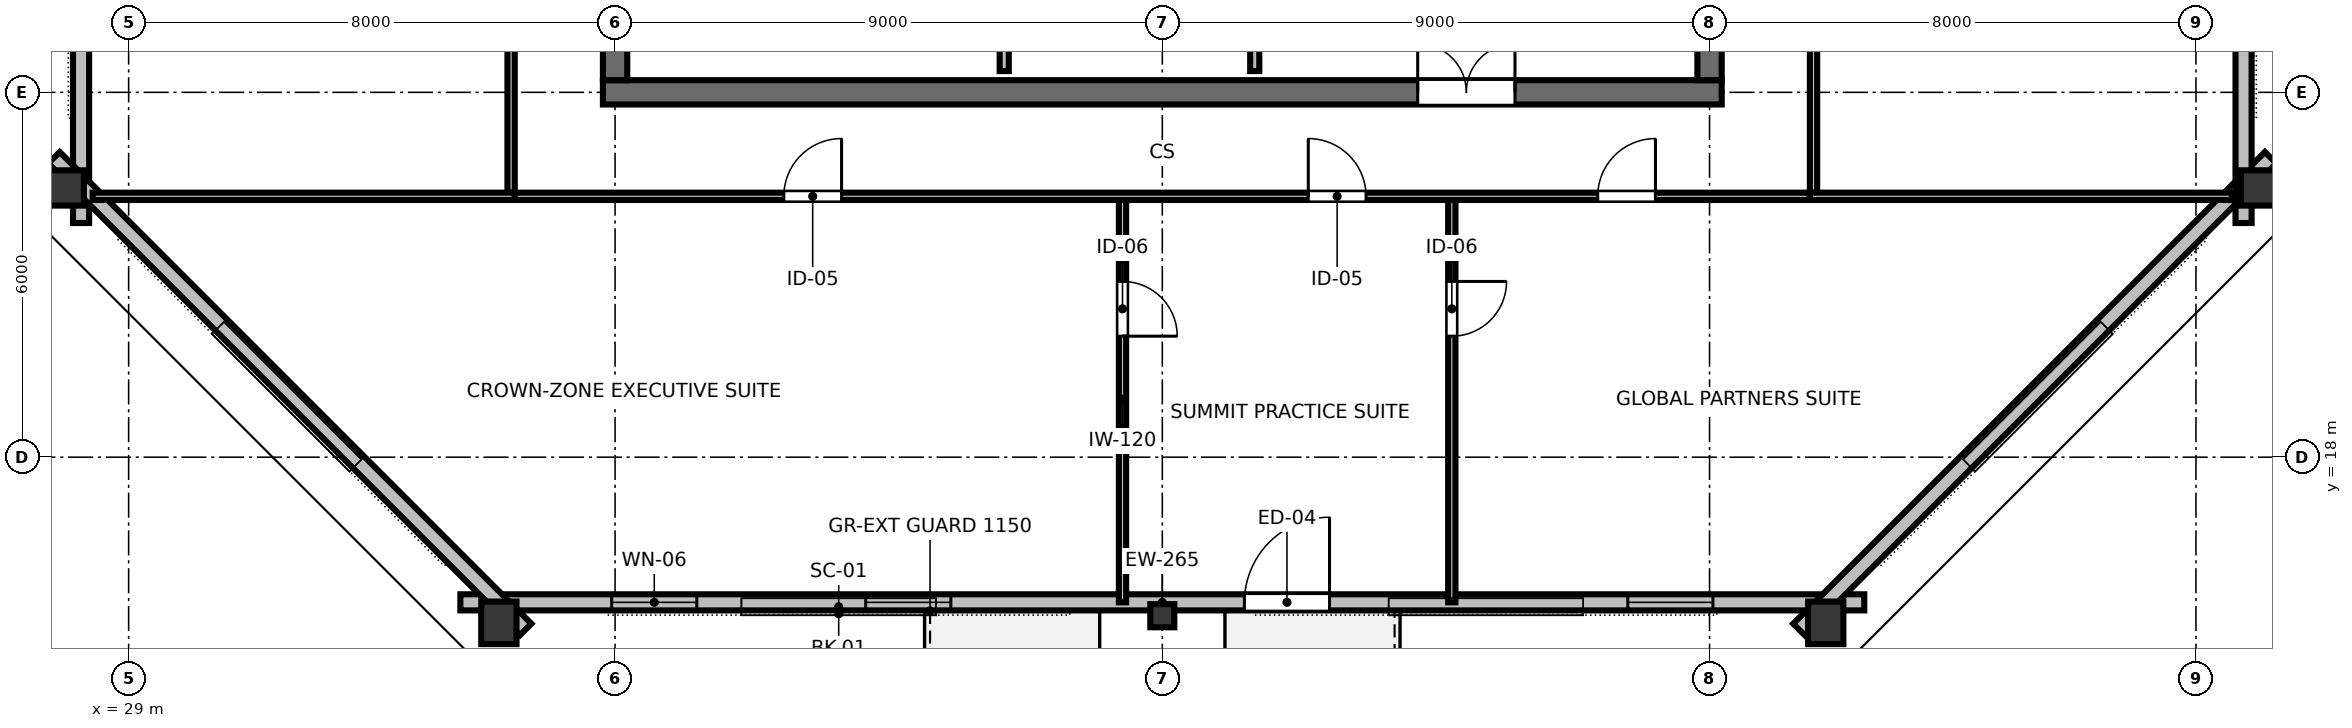
"""IFC4 building model, lengths in metres.
Left out: names, types, materials, properties, quantities, classifications, styles, units other than length and angle.
Written with IfcOpenShell. Run it as: python <this file> out.ifc"""

import sys

from ifc_helpers import new_model, si_unit, direction, frame, frame_2d, origin, origin_2d, place, context, subcontext, project, spatial, rectangle, hollow_rectangle, i_section, extrude, element, fill, save


model = new_model("IFC4")
c1 = context("Model", 3, precision=1e-05, world=origin(), true_north=direction((0.0, 1.0)))
c2 = subcontext(c1, "Body", "Model", "MODEL_VIEW")
j1 = project(units=[si_unit("LENGTHUNIT", "METRE"), si_unit("PLANEANGLEUNIT", "RADIAN")], contexts=[c1])
p1 = place(None, origin())
s1 = spatial("IfcSite", under=j1, at=p1, CompositionType="ELEMENT")
p2 = place(p1, origin())
s2 = spatial("IfcBuilding", under=s1, at=p2, CompositionType="ELEMENT")
p3 = place(p2, frame((0.0, 0.0, 261.0)))
s3 = spatial("IfcBuildingStorey", under=s2, at=p3, CompositionType="ELEMENT", Elevation=261.0)
p4 = place(p3, frame((36.8, 24.0, 0.0), z_axis=(0.0, 0.0, 1.0), x_axis=(1.0, 0.0, 0.0)))
e1 = element("IfcWall", 1, at=p4, inside=s3, PredefinedType="SHEAR", context=c2, shape_type="SweptSolid", body=[
    extrude(rectangle(XDim=18.4, YDim=0.4, at=frame_2d((9.2, 0.0))), origin(), (0.0, 0.0, 1.0), 3.36),
])
p5 = place(p4, frame((13.4, 0.0, 0.0)))
e2 = element("IfcOpeningElement", 2, at=p5, cuts=e1, PredefinedType="OPENING", context=c2, shape_type="SweptSolid", body=[
    extrude(rectangle(XDim=1.6, YDim=2.15, at=frame_2d((0.8, 1.075))), frame((0.0, 0.21, 0.0), z_axis=(0.0, -1.0, 0.0), x_axis=(1.0, 0.0, 0.0)), (0.0, 0.0, 1.0), 0.42),
])
p6 = place(p3, frame((37.0, 24.2, 0.0), z_axis=(0.0, 0.0, 1.0), x_axis=(0.0, 1.0, 0.0)))
e3 = element("IfcWall", 3, at=p6, inside=s3, PredefinedType="SHEAR", context=c2, shape_type="SweptSolid", body=[
    extrude(rectangle(XDim=15.6, YDim=0.4, at=frame_2d((7.8, 0.0))), origin(), (0.0, 0.0, 1.0), 3.36),
])
p7 = place(p6, frame((5.325, 0.0, 0.0)))
e4 = element("IfcOpeningElement", 4, at=p7, cuts=e3, PredefinedType="OPENING", context=c2, shape_type="SweptSolid", body=[
    extrude(rectangle(XDim=1.15, YDim=2.15, at=frame_2d((0.575, 1.075))), frame((0.0, 0.21, 0.0), z_axis=(0.0, -1.0, 0.0), x_axis=(1.0, 0.0, 0.0)), (0.0, 0.0, 1.0), 0.42),
])
p8 = place(p3, frame((55.0, 24.2, 0.0), z_axis=(0.0, 0.0, 1.0), x_axis=(0.0, 1.0, 0.0)))
e5 = element("IfcWall", 5, at=p8, inside=s3, PredefinedType="SHEAR", context=c2, shape_type="SweptSolid", body=[
    extrude(rectangle(XDim=15.6, YDim=0.4, at=frame_2d((7.8, 0.0))), origin(), (0.0, 0.0, 1.0), 3.36),
])
p9 = place(p8, frame((5.325, 0.0, 0.0)))
e6 = element("IfcOpeningElement", 6, at=p9, cuts=e5, PredefinedType="OPENING", context=c2, shape_type="SweptSolid", body=[
    extrude(rectangle(XDim=1.15, YDim=2.15, at=frame_2d((0.575, 1.075))), frame((0.0, 0.21, 0.0), z_axis=(0.0, -1.0, 0.0), x_axis=(1.0, 0.0, 0.0)), (0.0, 0.0, 1.0), 0.42),
])
p10 = place(p3, frame((35.089, 15.276, 0.0), z_axis=(0.0, 0.0, 1.0), x_axis=(1.0, 0.0, 0.0)))
e7 = element("IfcColumn", 7, at=p10, inside=s3, PredefinedType="COLUMN", context=c2, shape_type="SweptSolid", body=[
    extrude(hollow_rectangle(XDim=0.58, YDim=0.7, WallThickness=0.032, at=origin_2d()), origin(), (0.0, 0.0, 1.0), 3.373),
])
p11 = place(p3, frame((46.0, 15.393, 0.0), z_axis=(0.0, 0.0, 1.0), x_axis=(1.0, 0.0, 0.0)))
e8 = element("IfcColumn", 8, at=p11, inside=s3, PredefinedType="COLUMN", context=c2, shape_type="SweptSolid", body=[
    extrude(i_section(OverallWidth=0.395, OverallDepth=0.38, WebThickness=0.019, FlangeThickness=0.03, FilletRadius=0.025, at=origin_2d()), origin(), (0.0, 0.0, 1.0), 3.373),
])
for number, where, z_axis, x_axis in (
    (9, (56.911, 15.276, 0.0), (0.0, 0.0, 1.0), (1.0, 0.0, 0.0)),
    (10, (64.086, 22.428, 0.0), (0.0, 0.0, 1.0), (0.0, 1.0, 0.0)),
    (11, (27.914, 22.428, 0.0), (0.0, 0.0, 1.0), (0.0, 1.0, 0.0)),
):
    element("IfcColumn", number, at=place(p3, frame(where, z_axis=z_axis, x_axis=x_axis)), inside=s3, PredefinedType="COLUMN", context=c2, shape_type="SweptSolid", body=[
        extrude(hollow_rectangle(XDim=0.58, YDim=0.7, WallThickness=0.032, at=origin_2d()), origin(), (0.0, 0.0, 1.0), 3.373),
    ])
p12 = place(p3, frame((34.456, 15.613, 0.0), z_axis=(0.0, 0.0, 1.0), x_axis=(1.0, 0.0, 0.0)))
e12 = element("IfcWall", 12, at=p12, inside=s3, PredefinedType="STANDARD", context=c2, shape_type="SweptSolid", body=[
    extrude(rectangle(XDim=23.089, YDim=0.265, at=frame_2d((11.544, 0.0))), origin(), (0.0, 0.0, 1.0), 2.832),
])
p13 = place(p12, frame((12.895, 0.0, 0.0)))
e13 = element("IfcOpeningElement", 13, at=p13, cuts=e12, PredefinedType="OPENING", context=c2, shape_type="SweptSolid", body=[
    extrude(rectangle(XDim=1.4, YDim=2.15, at=frame_2d((0.7, 1.075))), frame((0.0, 0.142, 0.0), z_axis=(0.0, -1.0, 0.0), x_axis=(1.0, 0.0, 0.0)), (0.0, 0.0, 1.0), 0.285),
])
p14 = place(p12, frame((2.489, 0.0, 0.85)))
e14 = element("IfcOpeningElement", 14, at=p14, cuts=e12, PredefinedType="OPENING", context=c2, shape_type="SweptSolid", body=[
    extrude(rectangle(XDim=1.4, YDim=1.2, at=frame_2d((0.7, 0.6))), frame((0.0, 0.142, 0.0), z_axis=(0.0, -1.0, 0.0), x_axis=(1.0, 0.0, 0.0)), (0.0, 0.0, 1.0), 0.285),
])
p15 = place(p12, frame((6.667, 0.0, 0.85)))
e15 = element("IfcOpeningElement", 15, at=p15, cuts=e12, PredefinedType="OPENING", context=c2, shape_type="SweptSolid", body=[
    extrude(rectangle(XDim=1.4, YDim=1.2, at=frame_2d((0.7, 0.6))), frame((0.0, 0.142, 0.0), z_axis=(0.0, -1.0, 0.0), x_axis=(1.0, 0.0, 0.0)), (0.0, 0.0, 1.0), 0.285),
])
p16 = place(p12, frame((19.2, 0.0, 0.85)))
e16 = element("IfcOpeningElement", 16, at=p16, cuts=e12, PredefinedType="OPENING", context=c2, shape_type="SweptSolid", body=[
    extrude(rectangle(XDim=1.4, YDim=1.2, at=frame_2d((0.7, 0.6))), frame((0.0, 0.142, 0.0), z_axis=(0.0, -1.0, 0.0), x_axis=(1.0, 0.0, 0.0)), (0.0, 0.0, 1.0), 0.285),
])
p17 = place(p3, frame((56.47, 15.168, 0.0), z_axis=(0.0, 0.0, 1.0), x_axis=(0.707106781187, 0.707106781187, 0.0)))
e17 = element("IfcWall", 17, at=p17, inside=s3, PredefinedType="STANDARD", context=c2, shape_type="SweptSolid", body=[
    extrude(rectangle(XDim=10.971, YDim=0.265, at=frame_2d((5.485, 0.0))), origin(), (0.0, 0.0, 1.0), 2.832),
])
for number, where, z_axis, x_axis in (
    (18, (63.783, 21.851, 0.0), (0.0, 0.0, 1.0), (0.0, 1.0, 0.0)),
    (19, (28.217, 42.149, 0.0), (0.0, 0.0, 1.0), (0.0, -1.0, 0.0)),
):
    element("IfcWall", number, at=place(p3, frame(where, z_axis=z_axis, x_axis=x_axis)), inside=s3, PredefinedType="STANDARD", context=c2, shape_type="SweptSolid", body=[
        extrude(rectangle(XDim=20.298, YDim=0.265, at=frame_2d((10.149, 0.0))), origin(), (0.0, 0.0, 1.0), 2.832),
    ])
p18 = place(p3, frame((27.772, 22.925, 0.0), z_axis=(0.0, 0.0, 1.0), x_axis=(0.707106781187, -0.707106781187, 0.0)))
e20 = element("IfcWall", 20, at=p18, inside=s3, PredefinedType="STANDARD", context=c2, shape_type="SweptSolid", body=[
    extrude(rectangle(XDim=10.971, YDim=0.265, at=frame_2d((5.485, 0.0))), origin(), (0.0, 0.0, 1.0), 2.832),
])
p19 = place(p3, frame((43.4, 24.35, 0.0), z_axis=(0.0, 0.0, 1.0), x_axis=(0.0, 1.0, 0.0)))
e21 = element("IfcWall", 21, at=p19, inside=s3, PredefinedType="PARTITIONING", context=c2, shape_type="SweptSolid", body=[
    extrude(rectangle(XDim=3.9, YDim=0.15, at=frame_2d((1.95, 0.0))), origin(), (0.0, 0.0, 1.0), 3.375),
])
p20 = place(p19, frame((1.5, 0.0, 0.0)))
e22 = element("IfcOpeningElement", 22, at=p20, cuts=e21, PredefinedType="OPENING", context=c2, shape_type="SweptSolid", body=[
    extrude(rectangle(XDim=0.9, YDim=2.15, at=frame_2d((0.45, 1.075))), frame((0.0, 0.085, 0.0), z_axis=(0.0, -1.0, 0.0), x_axis=(1.0, 0.0, 0.0)), (0.0, 0.0, 1.0), 0.17),
])
p21 = place(p3, frame((47.52, 24.35, 0.0), z_axis=(0.0, 0.0, 1.0), x_axis=(0.0, 1.0, 0.0)))
e23 = element("IfcWall", 23, at=p21, inside=s3, PredefinedType="PARTITIONING", context=c2, shape_type="SweptSolid", body=[
    extrude(rectangle(XDim=3.9, YDim=0.15, at=frame_2d((1.95, 0.0))), origin(), (0.0, 0.0, 1.0), 3.375),
])
p22 = place(p21, frame((0.35, 0.0, 0.0)))
e24 = element("IfcOpeningElement", 24, at=p22, cuts=e23, PredefinedType="OPENING", context=c2, shape_type="SweptSolid", body=[
    extrude(rectangle(XDim=0.9, YDim=2.15, at=frame_2d((0.45, 1.075))), frame((0.0, 0.085, 0.0), z_axis=(0.0, -1.0, 0.0), x_axis=(1.0, 0.0, 0.0)), (0.0, 0.0, 1.0), 0.17),
])
p23 = place(p3, frame((45.345, 22.29, 0.0), z_axis=(0.0, 0.0, 1.0), x_axis=(0.0, -1.0, 0.0)))
e25 = element("IfcWall", 25, at=p23, inside=s3, PredefinedType="PARTITIONING", context=c2, shape_type="SweptSolid", body=[
    extrude(rectangle(XDim=6.677, YDim=0.12, at=frame_2d((3.339, 0.0))), origin(), (0.0, 0.0, 1.0), 2.655),
])
p24 = place(p23, frame((1.4, 0.0, 0.0)))
e26 = element("IfcOpeningElement", 26, at=p24, cuts=e25, PredefinedType="OPENING", context=c2, shape_type="SweptSolid", body=[
    extrude(rectangle(XDim=0.9, YDim=2.15, at=frame_2d((0.45, 1.075))), frame((0.0, 0.07, 0.0), z_axis=(0.0, -1.0, 0.0), x_axis=(1.0, 0.0, 0.0)), (0.0, 0.0, 1.0), 0.14),
])
p25 = place(p3, frame((50.761, 22.29, 0.0), z_axis=(0.0, 0.0, 1.0), x_axis=(0.0, -1.0, 0.0)))
e27 = element("IfcWall", 27, at=p25, inside=s3, PredefinedType="PARTITIONING", context=c2, shape_type="SweptSolid", body=[
    extrude(rectangle(XDim=6.677, YDim=0.12, at=frame_2d((3.339, 0.0))), origin(), (0.0, 0.0, 1.0), 2.655),
])
p26 = place(p25, frame((1.4, 0.0, 0.0)))
e28 = element("IfcOpeningElement", 28, at=p26, cuts=e27, PredefinedType="OPENING", context=c2, shape_type="SweptSolid", body=[
    extrude(rectangle(XDim=0.9, YDim=2.15, at=frame_2d((0.45, 1.075))), frame((0.0, 0.07, 0.0), z_axis=(0.0, -1.0, 0.0), x_axis=(1.0, 0.0, 0.0)), (0.0, 0.0, 1.0), 0.14),
])
p27 = place(p3, frame((35.35, 22.29, 0.0), z_axis=(0.0, 0.0, 1.0), x_axis=(1.0, 0.0, 0.0)))
e29 = element("IfcWall", 29, at=p27, inside=s3, PredefinedType="PARTITIONING", context=c2, shape_type="SweptSolid", body=[
    extrude(rectangle(XDim=21.3, YDim=0.12, at=frame_2d((10.65, 0.0))), origin(), (0.0, 0.0, 1.0), 2.655),
])
p28 = place(p27, frame((4.425, 0.0, 0.0)))
e30 = element("IfcOpeningElement", 30, at=p28, cuts=e29, PredefinedType="OPENING", context=c2, shape_type="SweptSolid", body=[
    extrude(rectangle(XDim=0.95, YDim=2.15, at=frame_2d((0.475, 1.075))), frame((0.0, 0.07, 0.0), z_axis=(0.0, -1.0, 0.0), x_axis=(1.0, 0.0, 0.0)), (0.0, 0.0, 1.0), 0.14),
])
p29 = place(p27, frame((13.051, 0.0, 0.0)))
e31 = element("IfcOpeningElement", 31, at=p29, cuts=e29, PredefinedType="OPENING", context=c2, shape_type="SweptSolid", body=[
    extrude(rectangle(XDim=0.95, YDim=2.15, at=frame_2d((0.475, 1.075))), frame((0.0, 0.07, 0.0), z_axis=(0.0, -1.0, 0.0), x_axis=(1.0, 0.0, 0.0)), (0.0, 0.0, 1.0), 0.14),
])
p30 = place(p27, frame((17.811, 0.0, 0.0)))
e32 = element("IfcOpeningElement", 32, at=p30, cuts=e29, PredefinedType="OPENING", context=c2, shape_type="SweptSolid", body=[
    extrude(rectangle(XDim=0.95, YDim=2.15, at=frame_2d((0.475, 1.075))), frame((0.0, 0.07, 0.0), z_axis=(0.0, -1.0, 0.0), x_axis=(1.0, 0.0, 0.0)), (0.0, 0.0, 1.0), 0.14),
])
p31 = place(p3, frame((35.29, 22.35, 0.0), z_axis=(0.0, 0.0, 1.0), x_axis=(0.0, 1.0, 0.0)))
e33 = element("IfcWall", 33, at=p31, inside=s3, PredefinedType="PARTITIONING", context=c2, shape_type="SweptSolid", body=[
    extrude(rectangle(XDim=19.3, YDim=0.12, at=frame_2d((9.65, 0.0))), origin(), (0.0, 0.0, 1.0), 2.655),
])
p32 = place(p31, frame((2.847, 0.0, 0.0)))
e34 = element("IfcOpeningElement", 34, at=p32, cuts=e33, PredefinedType="OPENING", context=c2, shape_type="SweptSolid", body=[
    extrude(rectangle(XDim=0.95, YDim=2.15, at=frame_2d((0.475, 1.075))), frame((0.0, 0.07, 0.0), z_axis=(0.0, -1.0, 0.0), x_axis=(1.0, 0.0, 0.0)), (0.0, 0.0, 1.0), 0.14),
])
p33 = place(p31, frame((8.606, 0.0, 0.0)))
e35 = element("IfcOpeningElement", 35, at=p33, cuts=e33, PredefinedType="OPENING", context=c2, shape_type="SweptSolid", body=[
    extrude(rectangle(XDim=0.95, YDim=2.15, at=frame_2d((0.475, 1.075))), frame((0.0, 0.07, 0.0), z_axis=(0.0, -1.0, 0.0), x_axis=(1.0, 0.0, 0.0)), (0.0, 0.0, 1.0), 0.14),
])
p34 = place(p31, frame((14.935, 0.0, 0.0)))
e36 = element("IfcOpeningElement", 36, at=p34, cuts=e33, PredefinedType="OPENING", context=c2, shape_type="SweptSolid", body=[
    extrude(rectangle(XDim=0.95, YDim=2.15, at=frame_2d((0.475, 1.075))), frame((0.0, 0.07, 0.0), z_axis=(0.0, -1.0, 0.0), x_axis=(1.0, 0.0, 0.0)), (0.0, 0.0, 1.0), 0.14),
])
p35 = place(p3, frame((56.71, 22.35, 0.0), z_axis=(0.0, 0.0, 1.0), x_axis=(0.0, 1.0, 0.0)))
e37 = element("IfcWall", 37, at=p35, inside=s3, PredefinedType="PARTITIONING", context=c2, shape_type="SweptSolid", body=[
    extrude(rectangle(XDim=19.3, YDim=0.12, at=frame_2d((9.65, 0.0))), origin(), (0.0, 0.0, 1.0), 2.655),
])
p36 = place(p35, frame((3.646, 0.0, 0.0)))
e38 = element("IfcOpeningElement", 38, at=p36, cuts=e37, PredefinedType="OPENING", context=c2, shape_type="SweptSolid", body=[
    extrude(rectangle(XDim=0.95, YDim=2.15, at=frame_2d((0.475, 1.075))), frame((0.0, 0.07, 0.0), z_axis=(0.0, -1.0, 0.0), x_axis=(1.0, 0.0, 0.0)), (0.0, 0.0, 1.0), 0.14),
])
p37 = place(p35, frame((13.096, 0.0, 0.0)))
e39 = element("IfcOpeningElement", 39, at=p37, cuts=e37, PredefinedType="OPENING", context=c2, shape_type="SweptSolid", body=[
    extrude(rectangle(XDim=0.95, YDim=2.15, at=frame_2d((0.475, 1.075))), frame((0.0, 0.07, 0.0), z_axis=(0.0, -1.0, 0.0), x_axis=(1.0, 0.0, 0.0)), (0.0, 0.0, 1.0), 0.14),
])
for number, where, z_axis, x_axis in (
    (40, (35.35, 22.29, 0.0), (0.0, 0.0, 1.0), (-1.0, 0.0, 0.0)),
    (41, (56.65, 22.29, 0.0), (0.0, 0.0, 1.0), (1.0, 0.0, 0.0)),
):
    element("IfcWall", number, at=place(p3, frame(where, z_axis=z_axis, x_axis=x_axis)), inside=s3, PredefinedType="PARTITIONING", context=c2, shape_type="SweptSolid", body=[
        extrude(rectangle(XDim=6.942, YDim=0.12, at=frame_2d((3.471, 0.0))), origin(), (0.0, 0.0, 1.0), 2.655),
    ])
p38 = place(p13, origin())
e42 = element("IfcDoor", 42, at=p38, inside=s3, OperationType="SINGLE_SWING_RIGHT", PredefinedType="DOOR", context=c2, shape_type="SweptSolid", body=[
    extrude(rectangle(XDim=1.4, YDim=2.15, at=frame_2d((0.7, 1.075))), frame((0.0, 0.025, 0.0), z_axis=(0.0, -1.0, 0.0), x_axis=(1.0, 0.0, 0.0)), (0.0, 0.0, 1.0), 0.05),
])
fill(e13, e42)
p39 = place(p14, origin())
e43 = element("IfcWindow", 43, at=p39, inside=s3, PartitioningType="SINGLE_PANEL", PredefinedType="WINDOW", context=c2, shape_type="SweptSolid", body=[
    extrude(rectangle(XDim=1.4, YDim=1.2, at=frame_2d((0.7, 0.6))), frame((0.0, 0.03, 0.0), z_axis=(0.0, -1.0, 0.0), x_axis=(1.0, 0.0, 0.0)), (0.0, 0.0, 1.0), 0.06),
])
fill(e14, e43)
p40 = place(p15, origin())
e44 = element("IfcWindow", 44, at=p40, inside=s3, PartitioningType="SINGLE_PANEL", PredefinedType="WINDOW", context=c2, shape_type="SweptSolid", body=[
    extrude(rectangle(XDim=1.4, YDim=1.2, at=frame_2d((0.7, 0.6))), frame((0.0, 0.03, 0.0), z_axis=(0.0, -1.0, 0.0), x_axis=(1.0, 0.0, 0.0)), (0.0, 0.0, 1.0), 0.06),
])
fill(e15, e44)
p41 = place(p16, origin())
e45 = element("IfcWindow", 45, at=p41, inside=s3, PartitioningType="SINGLE_PANEL", PredefinedType="WINDOW", context=c2, shape_type="SweptSolid", body=[
    extrude(rectangle(XDim=1.4, YDim=1.2, at=frame_2d((0.7, 0.6))), frame((0.0, 0.03, 0.0), z_axis=(0.0, -1.0, 0.0), x_axis=(1.0, 0.0, 0.0)), (0.0, 0.0, 1.0), 0.06),
])
fill(e16, e45)
p42 = place(p5, origin())
e46 = element("IfcDoor", 46, at=p42, inside=s3, OperationType="DOUBLE_DOOR_SINGLE_SWING", PredefinedType="DOOR", context=c2, shape_type="SweptSolid", body=[
    extrude(rectangle(XDim=1.6, YDim=2.15, at=frame_2d((0.8, 1.075))), frame((0.0, 0.025, 0.0), z_axis=(0.0, -1.0, 0.0), x_axis=(1.0, 0.0, 0.0)), (0.0, 0.0, 1.0), 0.05),
])
fill(e2, e46)
p43 = place(p24, origin())
e47 = element("IfcDoor", 47, at=p43, inside=s3, OperationType="SINGLE_SWING_RIGHT", PredefinedType="DOOR", context=c2, shape_type="SweptSolid", body=[
    extrude(rectangle(XDim=0.9, YDim=2.15, at=frame_2d((0.45, 1.075))), frame((0.0, 0.025, 0.0), z_axis=(0.0, -1.0, 0.0), x_axis=(1.0, 0.0, 0.0)), (0.0, 0.0, 1.0), 0.05),
])
fill(e26, e47)
p44 = place(p26, origin())
e48 = element("IfcDoor", 48, at=p44, inside=s3, OperationType="SINGLE_SWING_LEFT", PredefinedType="DOOR", context=c2, shape_type="SweptSolid", body=[
    extrude(rectangle(XDim=0.9, YDim=2.15, at=frame_2d((0.45, 1.075))), frame((0.0, 0.025, 0.0), z_axis=(0.0, -1.0, 0.0), x_axis=(1.0, 0.0, 0.0)), (0.0, 0.0, 1.0), 0.05),
])
fill(e28, e48)
p45 = place(p28, origin())
e49 = element("IfcDoor", 49, at=p45, inside=s3, OperationType="SINGLE_SWING_RIGHT", PredefinedType="DOOR", context=c2, shape_type="SweptSolid", body=[
    extrude(rectangle(XDim=0.95, YDim=2.15, at=frame_2d((0.475, 1.075))), frame((0.0, 0.025, 0.0), z_axis=(0.0, -1.0, 0.0), x_axis=(1.0, 0.0, 0.0)), (0.0, 0.0, 1.0), 0.05),
])
fill(e30, e49)
p46 = place(p29, origin())
e50 = element("IfcDoor", 50, at=p46, inside=s3, OperationType="SINGLE_SWING_LEFT", PredefinedType="DOOR", context=c2, shape_type="SweptSolid", body=[
    extrude(rectangle(XDim=0.95, YDim=2.15, at=frame_2d((0.475, 1.075))), frame((0.0, 0.025, 0.0), z_axis=(0.0, -1.0, 0.0), x_axis=(1.0, 0.0, 0.0)), (0.0, 0.0, 1.0), 0.05),
])
fill(e31, e50)
p47 = place(p30, origin())
e51 = element("IfcDoor", 51, at=p47, inside=s3, OperationType="SINGLE_SWING_RIGHT", PredefinedType="DOOR", context=c2, shape_type="SweptSolid", body=[
    extrude(rectangle(XDim=0.95, YDim=2.15, at=frame_2d((0.475, 1.075))), frame((0.0, 0.025, 0.0), z_axis=(0.0, -1.0, 0.0), x_axis=(1.0, 0.0, 0.0)), (0.0, 0.0, 1.0), 0.05),
])
fill(e32, e51)
save(model, sys.argv[1])
